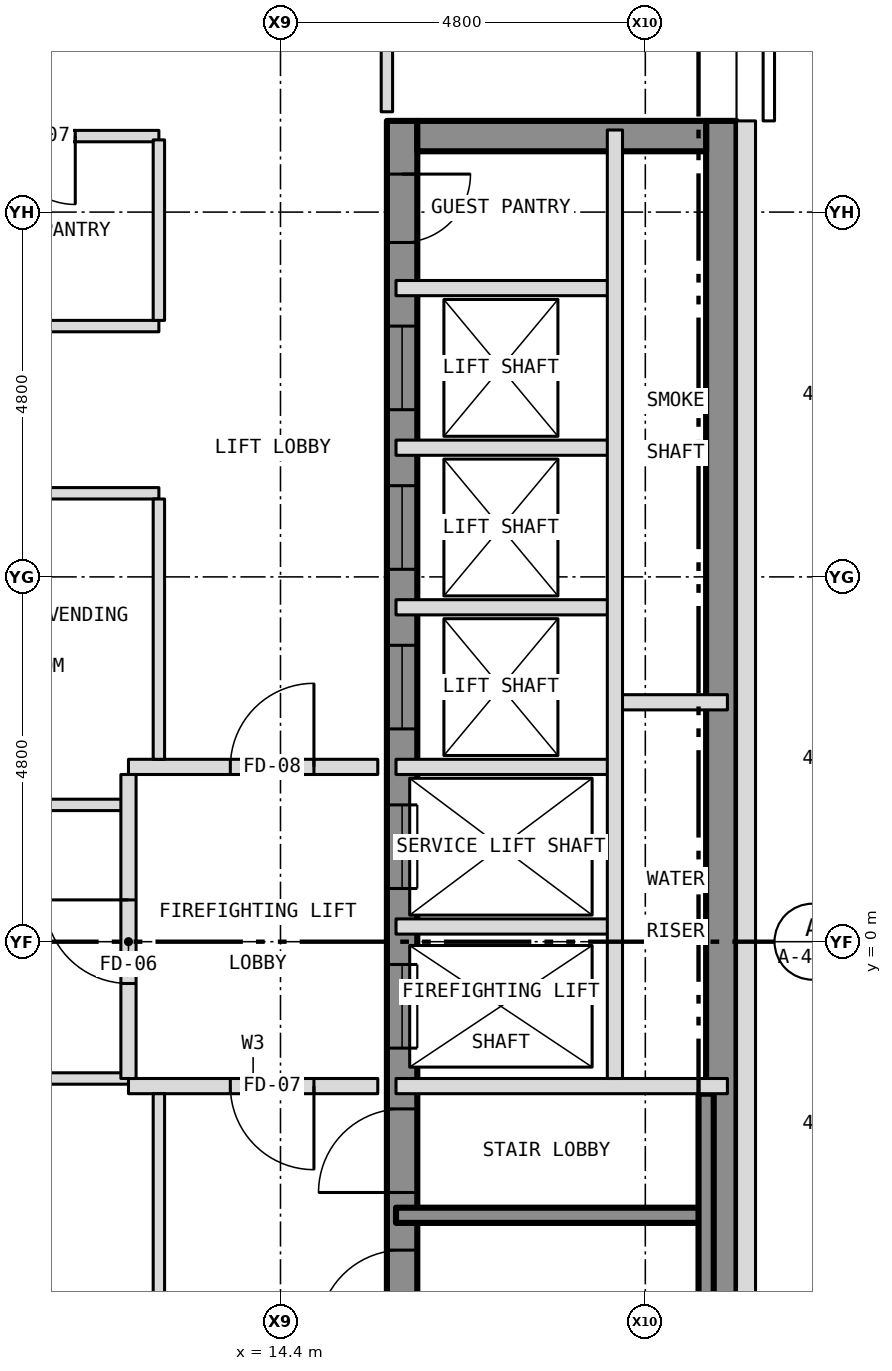
"""IFC4 building model, lengths in metres.
Left out: names, types, materials, properties, quantities, classifications, styles, units other than length and angle.
Written with IfcOpenShell. Run it as: python <this file> out.ifc"""

import sys

from ifc_helpers import new_model, si_unit, direction, frame, frame_2d, origin, place, context, subcontext, project, spatial, rectangle, extrude, element, fill, save


model = new_model("IFC4")
c1 = context("Model", 3, precision=1e-05, world=origin(), true_north=direction((0.0, 1.0)))
c2 = subcontext(c1, "Body", "Model", "MODEL_VIEW")
j1 = project(units=[si_unit("LENGTHUNIT", "METRE"), si_unit("PLANEANGLEUNIT", "RADIAN")], contexts=[c1])
p1 = place(None, origin())
s1 = spatial("IfcSite", under=j1, at=p1, CompositionType="ELEMENT")
p2 = place(p1, origin())
s2 = spatial("IfcBuilding", under=s1, at=p2, CompositionType="ELEMENT")
p3 = place(p2, frame((0.0, 0.0, 233.0)))
s3 = spatial("IfcBuildingStorey", under=s2, at=p3, CompositionType="ELEMENT", Elevation=233.0)
p4 = place(p3, frame((16.0, -10.8, 0.0), z_axis=(0.0, 0.0, 1.0), x_axis=(0.0, 1.0, 0.0)))
e1 = element("IfcWall", 1, at=p4, inside=s3, PredefinedType="SHEAR", context=c2, shape_type="SweptSolid", body=[
    extrude(rectangle(XDim=21.6, YDim=0.4, at=frame_2d((10.8, 0.0))), origin(), (0.0, 0.0, 1.0), 2.9),
])
p5 = place(p4, frame((9.4, 0.0, 0.0)))
e2 = element("IfcOpeningElement", 2, at=p5, cuts=e1, PredefinedType="OPENING", context=c2, shape_type="SweptSolid", body=[
    extrude(rectangle(XDim=1.1, YDim=2.1, at=frame_2d((0.55, 1.05))), frame((0.0, 0.212, 0.0), z_axis=(0.0, -1.0, 0.0), x_axis=(1.0, 0.0, 0.0)), (0.0, 0.0, 1.0), 0.424),
])
p6 = place(p4, frame((11.5, 0.0, 0.0)))
e3 = element("IfcOpeningElement", 3, at=p6, cuts=e1, PredefinedType="OPENING", context=c2, shape_type="SweptSolid", body=[
    extrude(rectangle(XDim=1.1, YDim=2.1, at=frame_2d((0.55, 1.05))), frame((0.0, 0.212, 0.0), z_axis=(0.0, -1.0, 0.0), x_axis=(1.0, 0.0, 0.0)), (0.0, 0.0, 1.0), 0.424),
])
p7 = place(p4, frame((13.6, 0.0, 0.0)))
e4 = element("IfcOpeningElement", 4, at=p7, cuts=e1, PredefinedType="OPENING", context=c2, shape_type="SweptSolid", body=[
    extrude(rectangle(XDim=1.1, YDim=2.1, at=frame_2d((0.55, 1.05))), frame((0.0, 0.212, 0.0), z_axis=(0.0, -1.0, 0.0), x_axis=(1.0, 0.0, 0.0)), (0.0, 0.0, 1.0), 0.424),
])
p8 = place(p4, frame((15.7, 0.0, 0.0)))
e5 = element("IfcOpeningElement", 5, at=p8, cuts=e1, PredefinedType="OPENING", context=c2, shape_type="SweptSolid", body=[
    extrude(rectangle(XDim=1.1, YDim=2.1, at=frame_2d((0.55, 1.05))), frame((0.0, 0.212, 0.0), z_axis=(0.0, -1.0, 0.0), x_axis=(1.0, 0.0, 0.0)), (0.0, 0.0, 1.0), 0.424),
])
p9 = place(p4, frame((17.8, 0.0, 0.0)))
e6 = element("IfcOpeningElement", 6, at=p9, cuts=e1, PredefinedType="OPENING", context=c2, shape_type="SweptSolid", body=[
    extrude(rectangle(XDim=1.1, YDim=2.1, at=frame_2d((0.55, 1.05))), frame((0.0, 0.212, 0.0), z_axis=(0.0, -1.0, 0.0), x_axis=(1.0, 0.0, 0.0)), (0.0, 0.0, 1.0), 0.424),
])
p10 = place(p4, frame((5.642, 0.0, 0.0)))
e7 = element("IfcOpeningElement", 7, at=p10, cuts=e1, PredefinedType="OPENING", context=c2, shape_type="SweptSolid", body=[
    extrude(rectangle(XDim=1.1, YDim=2.1, at=frame_2d((0.55, 1.05))), frame((0.0, 0.212, 0.0), z_axis=(0.0, -1.0, 0.0), x_axis=(1.0, 0.0, 0.0)), (0.0, 0.0, 1.0), 0.424),
])
p11 = place(p4, frame((7.5, 0.0, 0.0)))
e8 = element("IfcOpeningElement", 8, at=p11, cuts=e1, PredefinedType="OPENING", context=c2, shape_type="SweptSolid", body=[
    extrude(rectangle(XDim=1.1, YDim=2.1, at=frame_2d((0.55, 1.05))), frame((0.0, 0.212, 0.0), z_axis=(0.0, -1.0, 0.0), x_axis=(1.0, 0.0, 0.0)), (0.0, 0.0, 1.0), 0.424),
])
p12 = place(p4, frame((20.0, 0.0, 0.0)))
e9 = element("IfcOpeningElement", 9, at=p12, cuts=e1, PredefinedType="OPENING", context=c2, shape_type="SweptSolid", body=[
    extrude(rectangle(XDim=0.9, YDim=2.1, at=frame_2d((0.45, 1.05))), frame((0.0, 0.212, 0.0), z_axis=(0.0, -1.0, 0.0), x_axis=(1.0, 0.0, 0.0)), (0.0, 0.0, 1.0), 0.424),
])
p13 = place(p3, frame((20.2, -10.8, 0.0), z_axis=(0.0, 0.0, 1.0), x_axis=(0.0, 1.0, 0.0)))
e10 = element("IfcWall", 10, at=p13, inside=s3, PredefinedType="SHEAR", context=c2, shape_type="SweptSolid", body=[
    extrude(rectangle(XDim=21.6, YDim=0.4, at=frame_2d((10.8, 0.0))), origin(), (0.0, 0.0, 1.0), 2.9),
])
p14 = place(p3, frame((16.2, 10.6, 0.0), z_axis=(0.0, 0.0, 1.0), x_axis=(1.0, 0.0, 0.0)))
e11 = element("IfcWall", 11, at=p14, inside=s3, PredefinedType="SHEAR", context=c2, shape_type="SweptSolid", body=[
    extrude(rectangle(XDim=3.8, YDim=0.4, at=frame_2d((1.9, 0.0))), origin(), (0.0, 0.0, 1.0), 2.9),
])
p15 = place(p3, frame((20.525, -10.8, 0.0), z_axis=(0.0, 0.0, 1.0), x_axis=(0.0, 1.0, 0.0)))
e12 = element("IfcWall", 12, at=p15, inside=s3, PredefinedType="SOLIDWALL", context=c2, shape_type="SweptSolid", body=[
    extrude(rectangle(XDim=21.6, YDim=0.25, at=frame_2d((10.8, 0.0))), origin(), (0.0, 0.0, 1.0), 3.5),
])
p16 = place(p15, frame((2.95, 0.0, 1.0)))
e13 = element("IfcOpeningElement", 13, at=p16, cuts=e12, PredefinedType="OPENING", context=c2, shape_type="SweptSolid", body=[
    extrude(rectangle(XDim=0.6, YDim=1.5, at=frame_2d((0.3, 0.75))), frame((0.0, 0.137, 0.0), z_axis=(0.0, -1.0, 0.0), x_axis=(1.0, 0.0, 0.0)), (0.0, 0.0, 1.0), 0.274),
])
p17 = place(p3, frame((15.92, -3.6, 0.0), z_axis=(0.0, 0.0, 1.0), x_axis=(1.0, 0.0, 0.0)))
e14 = element("IfcWall", 14, at=p17, inside=s3, PredefinedType="SHEAR", context=c2, shape_type="SweptSolid", body=[
    extrude(rectangle(XDim=4.08, YDim=0.2, at=frame_2d((2.04, 0.0))), origin(), (0.0, 0.0, 1.0), 2.9),
])
p18 = place(p3, frame((12.4, -1.9, 0.0), z_axis=(0.0, 0.0, 1.0), x_axis=(1.0, 0.0, 0.0)))
e15 = element("IfcWall", 15, at=p18, inside=s3, PredefinedType="PARTITIONING", context=c2, shape_type="SweptSolid", body=[
    extrude(rectangle(XDim=3.28, YDim=0.2, at=frame_2d((1.64, 0.0))), origin(), (0.0, 0.0, 1.0), 3.2),
])
p19 = place(p18, frame((1.34, 0.0, 0.0)))
e16 = element("IfcOpeningElement", 16, at=p19, cuts=e15, PredefinedType="OPENING", context=c2, shape_type="SweptSolid", body=[
    extrude(rectangle(XDim=1.1, YDim=2.1, at=frame_2d((0.55, 1.05))), frame((0.0, 0.112, 0.0), z_axis=(0.0, -1.0, 0.0), x_axis=(1.0, 0.0, 0.0)), (0.0, 0.0, 1.0), 0.224),
])
p20 = place(p3, frame((15.92, -1.9, 0.0), z_axis=(0.0, 0.0, 1.0), x_axis=(1.0, 0.0, 0.0)))
e17 = element("IfcWall", 17, at=p20, inside=s3, PredefinedType="PARTITIONING", context=c2, shape_type="SweptSolid", body=[
    extrude(rectangle(XDim=4.36, YDim=0.2, at=frame_2d((2.18, 0.0))), origin(), (0.0, 0.0, 1.0), 2.9),
])
p21 = place(p3, frame((9.7, -1.8, 0.0), z_axis=(0.0, 0.0, 1.0), x_axis=(1.0, 0.0, 0.0)))
e18 = element("IfcWall", 18, at=p21, inside=s3, PredefinedType="PARTITIONING", context=c2, shape_type="SweptSolid", body=[
    extrude(rectangle(XDim=2.7, YDim=0.15, at=frame_2d((1.35, 0.0))), origin(), (0.0, 0.0, 1.0), 3.2),
])
p22 = place(p3, frame((15.92, 0.2, 0.0), z_axis=(0.0, 0.0, 1.0), x_axis=(1.0, 0.0, 0.0)))
e19 = element("IfcWall", 19, at=p22, inside=s3, PredefinedType="PARTITIONING", context=c2, shape_type="SweptSolid", body=[
    extrude(rectangle(XDim=2.88, YDim=0.2, at=frame_2d((1.44, 0.0))), origin(), (0.0, 0.0, 1.0), 2.9),
])
p23 = place(p3, frame((9.7, 1.8, 0.0), z_axis=(0.0, 0.0, 1.0), x_axis=(1.0, 0.0, 0.0)))
e20 = element("IfcWall", 20, at=p23, inside=s3, PredefinedType="PARTITIONING", context=c2, shape_type="SweptSolid", body=[
    extrude(rectangle(XDim=2.7, YDim=0.15, at=frame_2d((1.35, 0.0))), origin(), (0.0, 0.0, 1.0), 3.2),
])
p24 = place(p3, frame((12.4, 2.3, 0.0), z_axis=(0.0, 0.0, 1.0), x_axis=(1.0, 0.0, 0.0)))
e21 = element("IfcWall", 21, at=p24, inside=s3, PredefinedType="PARTITIONING", context=c2, shape_type="SweptSolid", body=[
    extrude(rectangle(XDim=3.28, YDim=0.2, at=frame_2d((1.64, 0.0))), origin(), (0.0, 0.0, 1.0), 3.2),
])
p25 = place(p24, frame((1.34, 0.0, 0.0)))
e22 = element("IfcOpeningElement", 22, at=p25, cuts=e21, PredefinedType="OPENING", context=c2, shape_type="SweptSolid", body=[
    extrude(rectangle(XDim=1.1, YDim=2.1, at=frame_2d((0.55, 1.05))), frame((0.0, 0.112, 0.0), z_axis=(0.0, -1.0, 0.0), x_axis=(1.0, 0.0, 0.0)), (0.0, 0.0, 1.0), 0.224),
])
p26 = place(p3, frame((15.92, 2.3, 0.0), z_axis=(0.0, 0.0, 1.0), x_axis=(1.0, 0.0, 0.0)))
e23 = element("IfcWall", 23, at=p26, inside=s3, PredefinedType="PARTITIONING", context=c2, shape_type="SweptSolid", body=[
    extrude(rectangle(XDim=2.88, YDim=0.2, at=frame_2d((1.44, 0.0))), origin(), (0.0, 0.0, 1.0), 2.9),
])
p27 = place(p3, frame((18.8, 3.15, 0.0), z_axis=(0.0, 0.0, 1.0), x_axis=(1.0, 0.0, 0.0)))
e24 = element("IfcWall", 24, at=p27, inside=s3, PredefinedType="PARTITIONING", context=c2, shape_type="SweptSolid", body=[
    extrude(rectangle(XDim=1.48, YDim=0.2, at=frame_2d((0.74, 0.0))), origin(), (0.0, 0.0, 1.0), 2.9),
])
p28 = place(p3, frame((15.92, 4.4, 0.0), z_axis=(0.0, 0.0, 1.0), x_axis=(1.0, 0.0, 0.0)))
e25 = element("IfcWall", 25, at=p28, inside=s3, PredefinedType="PARTITIONING", context=c2, shape_type="SweptSolid", body=[
    extrude(rectangle(XDim=2.88, YDim=0.2, at=frame_2d((1.44, 0.0))), origin(), (0.0, 0.0, 1.0), 2.9),
])
p29 = place(p3, frame((9.7, 5.9, 0.0), z_axis=(0.0, 0.0, 1.0), x_axis=(1.0, 0.0, 0.0)))
e26 = element("IfcWall", 26, at=p29, inside=s3, PredefinedType="PARTITIONING", context=c2, shape_type="SweptSolid", body=[
    extrude(rectangle(XDim=3.1, YDim=0.15, at=frame_2d((1.55, 0.0))), origin(), (0.0, 0.0, 1.0), 3.2),
])
p30 = place(p3, frame((15.92, 6.5, 0.0), z_axis=(0.0, 0.0, 1.0), x_axis=(1.0, 0.0, 0.0)))
e27 = element("IfcWall", 27, at=p30, inside=s3, PredefinedType="PARTITIONING", context=c2, shape_type="SweptSolid", body=[
    extrude(rectangle(XDim=2.88, YDim=0.2, at=frame_2d((1.44, 0.0))), origin(), (0.0, 0.0, 1.0), 2.9),
])
p31 = place(p3, frame((9.7, 8.1, 0.0), z_axis=(0.0, 0.0, 1.0), x_axis=(1.0, 0.0, 0.0)))
e28 = element("IfcWall", 28, at=p31, inside=s3, PredefinedType="PARTITIONING", context=c2, shape_type="SweptSolid", body=[
    extrude(rectangle(XDim=3.1, YDim=0.15, at=frame_2d((1.55, 0.0))), origin(), (0.0, 0.0, 1.0), 3.2),
])
p32 = place(p3, frame((15.92, 8.6, 0.0), z_axis=(0.0, 0.0, 1.0), x_axis=(1.0, 0.0, 0.0)))
e29 = element("IfcWall", 29, at=p32, inside=s3, PredefinedType="PARTITIONING", context=c2, shape_type="SweptSolid", body=[
    extrude(rectangle(XDim=2.88, YDim=0.2, at=frame_2d((1.44, 0.0))), origin(), (0.0, 0.0, 1.0), 2.9),
])
p33 = place(p3, frame((9.7, 10.6, 0.0), z_axis=(0.0, 0.0, 1.0), x_axis=(1.0, 0.0, 0.0)))
e30 = element("IfcWall", 30, at=p33, inside=s3, PredefinedType="PARTITIONING", context=c2, shape_type="SweptSolid", body=[
    extrude(rectangle(XDim=3.1, YDim=0.15, at=frame_2d((1.55, 0.0))), origin(), (0.0, 0.0, 1.0), 3.2),
])
p34 = place(p33, frame((1.1, 0.0, 0.0)))
e31 = element("IfcOpeningElement", 31, at=p34, cuts=e30, PredefinedType="OPENING", context=c2, shape_type="SweptSolid", body=[
    extrude(rectangle(XDim=0.9, YDim=2.1, at=frame_2d((0.45, 1.05))), frame((0.0, 0.087, 0.0), z_axis=(0.0, -1.0, 0.0), x_axis=(1.0, 0.0, 0.0)), (0.0, 0.0, 1.0), 0.174),
])
p35 = place(p3, frame((12.4, -1.8, 0.0), z_axis=(0.0, 0.0, 1.0), x_axis=(0.0, 1.0, 0.0)))
e32 = element("IfcWall", 32, at=p35, inside=s3, PredefinedType="PARTITIONING", context=c2, shape_type="SweptSolid", body=[
    extrude(rectangle(XDim=4.0, YDim=0.2, at=frame_2d((2.0, 0.0))), origin(), (0.0, 0.0, 1.0), 3.2),
])
p36 = place(p35, frame((1.25, 0.0, 0.0)))
e33 = element("IfcOpeningElement", 33, at=p36, cuts=e32, PredefinedType="OPENING", context=c2, shape_type="SweptSolid", body=[
    extrude(rectangle(XDim=1.1, YDim=2.1, at=frame_2d((0.55, 1.05))), frame((0.0, 0.112, 0.0), z_axis=(0.0, -1.0, 0.0), x_axis=(1.0, 0.0, 0.0)), (0.0, 0.0, 1.0), 0.224),
])
p37 = place(p3, frame((12.8, -10.525, 0.0), z_axis=(0.0, 0.0, 1.0), x_axis=(0.0, 1.0, 0.0)))
e34 = element("IfcWall", 34, at=p37, inside=s3, PredefinedType="PARTITIONING", context=c2, shape_type="SweptSolid", body=[
    extrude(rectangle(XDim=8.525, YDim=0.15, at=frame_2d((4.262, 0.0))), origin(), (0.0, 0.0, 1.0), 3.2),
])
p38 = place(p3, frame((12.8, 2.4, 0.0), z_axis=(0.0, 0.0, 1.0), x_axis=(0.0, 1.0, 0.0)))
e35 = element("IfcWall", 35, at=p38, inside=s3, PredefinedType="PARTITIONING", context=c2, shape_type="SweptSolid", body=[
    extrude(rectangle(XDim=3.425, YDim=0.15, at=frame_2d((1.712, 0.0))), origin(), (0.0, 0.0, 1.0), 3.2),
])
p39 = place(p3, frame((12.8, 8.175, 0.0), z_axis=(0.0, 0.0, 1.0), x_axis=(0.0, 1.0, 0.0)))
e36 = element("IfcWall", 36, at=p39, inside=s3, PredefinedType="PARTITIONING", context=c2, shape_type="SweptSolid", body=[
    extrude(rectangle(XDim=2.375, YDim=0.15, at=frame_2d((1.188, 0.0))), origin(), (0.0, 0.0, 1.0), 3.2),
])
p40 = place(p3, frame((15.8, 10.92, 0.0), z_axis=(0.0, 0.0, 1.0), x_axis=(0.0, 1.0, 0.0)))
e37 = element("IfcWall", 37, at=p40, inside=s3, PredefinedType="PARTITIONING", context=c2, shape_type="SweptSolid", body=[
    extrude(rectangle(XDim=1.805, YDim=0.15, at=frame_2d((0.903, 0.0))), origin(), (0.0, 0.0, 1.0), 3.2),
])
p41 = place(p3, frame((18.8, -1.8, 0.0), z_axis=(0.0, 0.0, 1.0), x_axis=(0.0, 1.0, 0.0)))
e38 = element("IfcWall", 38, at=p41, inside=s3, PredefinedType="PARTITIONING", context=c2, shape_type="SweptSolid", body=[
    extrude(rectangle(XDim=12.48, YDim=0.2, at=frame_2d((6.24, 0.0))), origin(), (0.0, 0.0, 1.0), 2.9),
])
p42 = place(p3, frame((20.0, -10.68, 0.0), z_axis=(0.0, 0.0, 1.0), x_axis=(0.0, 1.0, 0.0)))
e39 = element("IfcWall", 39, at=p42, inside=s3, PredefinedType="SHEAR", context=c2, shape_type="SweptSolid", body=[
    extrude(rectangle(XDim=8.68, YDim=0.2, at=frame_2d((4.34, 0.0))), origin(), (0.0, 0.0, 1.0), 2.9),
])
p43 = place(p5, origin())
e40 = element("IfcDoor", 40, at=p43, inside=s3, OperationType="SLIDING_TO_LEFT", PredefinedType="DOOR", context=c2, shape_type="SweptSolid", body=[
    extrude(rectangle(XDim=1.1, YDim=2.1, at=frame_2d((0.55, 1.05))), frame((0.0, 0.025, 0.0), z_axis=(0.0, -1.0, 0.0), x_axis=(1.0, 0.0, 0.0)), (0.0, 0.0, 1.0), 0.05),
])
fill(e2, e40)
p44 = place(p6, origin())
e41 = element("IfcDoor", 41, at=p44, inside=s3, OperationType="SLIDING_TO_LEFT", PredefinedType="DOOR", context=c2, shape_type="SweptSolid", body=[
    extrude(rectangle(XDim=1.1, YDim=2.1, at=frame_2d((0.55, 1.05))), frame((0.0, 0.025, 0.0), z_axis=(0.0, -1.0, 0.0), x_axis=(1.0, 0.0, 0.0)), (0.0, 0.0, 1.0), 0.05),
])
fill(e3, e41)
p45 = place(p7, origin())
e42 = element("IfcDoor", 42, at=p45, inside=s3, OperationType="SLIDING_TO_LEFT", PredefinedType="DOOR", context=c2, shape_type="SweptSolid", body=[
    extrude(rectangle(XDim=1.1, YDim=2.1, at=frame_2d((0.55, 1.05))), frame((0.0, 0.025, 0.0), z_axis=(0.0, -1.0, 0.0), x_axis=(1.0, 0.0, 0.0)), (0.0, 0.0, 1.0), 0.05),
])
fill(e4, e42)
p46 = place(p8, origin())
e43 = element("IfcDoor", 43, at=p46, inside=s3, OperationType="SLIDING_TO_LEFT", PredefinedType="DOOR", context=c2, shape_type="SweptSolid", body=[
    extrude(rectangle(XDim=1.1, YDim=2.1, at=frame_2d((0.55, 1.05))), frame((0.0, 0.025, 0.0), z_axis=(0.0, -1.0, 0.0), x_axis=(1.0, 0.0, 0.0)), (0.0, 0.0, 1.0), 0.05),
])
fill(e5, e43)
p47 = place(p9, origin())
e44 = element("IfcDoor", 44, at=p47, inside=s3, OperationType="SLIDING_TO_LEFT", PredefinedType="DOOR", context=c2, shape_type="SweptSolid", body=[
    extrude(rectangle(XDim=1.1, YDim=2.1, at=frame_2d((0.55, 1.05))), frame((0.0, 0.025, 0.0), z_axis=(0.0, -1.0, 0.0), x_axis=(1.0, 0.0, 0.0)), (0.0, 0.0, 1.0), 0.05),
])
fill(e6, e44)
p48 = place(p10, origin())
e45 = element("IfcDoor", 45, at=p48, inside=s3, OperationType="SINGLE_SWING_LEFT", PredefinedType="DOOR", context=c2, shape_type="SweptSolid", body=[
    extrude(rectangle(XDim=1.1, YDim=2.1, at=frame_2d((0.55, 1.05))), frame((0.0, 0.025, 0.0), z_axis=(0.0, -1.0, 0.0), x_axis=(1.0, 0.0, 0.0)), (0.0, 0.0, 1.0), 0.05),
])
fill(e7, e45)
p49 = place(p11, origin())
e46 = element("IfcDoor", 46, at=p49, inside=s3, OperationType="SINGLE_SWING_LEFT", PredefinedType="DOOR", context=c2, shape_type="SweptSolid", body=[
    extrude(rectangle(XDim=1.1, YDim=2.1, at=frame_2d((0.55, 1.05))), frame((0.0, 0.025, 0.0), z_axis=(0.0, -1.0, 0.0), x_axis=(1.0, 0.0, 0.0)), (0.0, 0.0, 1.0), 0.05),
])
fill(e8, e46)
p50 = place(p12, origin())
e47 = element("IfcDoor", 47, at=p50, inside=s3, OperationType="SINGLE_SWING_RIGHT", PredefinedType="DOOR", context=c2, shape_type="SweptSolid", body=[
    extrude(rectangle(XDim=0.9, YDim=2.1, at=frame_2d((0.45, 1.05))), frame((0.0, 0.025, 0.0), z_axis=(0.0, -1.0, 0.0), x_axis=(1.0, 0.0, 0.0)), (0.0, 0.0, 1.0), 0.05),
])
fill(e9, e47)
p51 = place(p36, origin())
e48 = element("IfcDoor", 48, at=p51, inside=s3, OperationType="SINGLE_SWING_RIGHT", PredefinedType="DOOR", context=c2, shape_type="SweptSolid", body=[
    extrude(rectangle(XDim=1.1, YDim=2.1, at=frame_2d((0.55, 1.05))), frame((0.0, 0.025, 0.0), z_axis=(0.0, -1.0, 0.0), x_axis=(1.0, 0.0, 0.0)), (0.0, 0.0, 1.0), 0.05),
])
fill(e33, e48)
p52 = place(p19, origin())
e49 = element("IfcDoor", 49, at=p52, inside=s3, OperationType="SINGLE_SWING_RIGHT", PredefinedType="DOOR", context=c2, shape_type="SweptSolid", body=[
    extrude(rectangle(XDim=1.1, YDim=2.1, at=frame_2d((0.55, 1.05))), frame((0.0, 0.025, 0.0), z_axis=(0.0, -1.0, 0.0), x_axis=(1.0, 0.0, 0.0)), (0.0, 0.0, 1.0), 0.05),
])
fill(e16, e49)
p53 = place(p25, origin())
e50 = element("IfcDoor", 50, at=p53, inside=s3, OperationType="SINGLE_SWING_RIGHT", PredefinedType="DOOR", context=c2, shape_type="SweptSolid", body=[
    extrude(rectangle(XDim=1.1, YDim=2.1, at=frame_2d((0.55, 1.05))), frame((0.0, 0.025, 0.0), z_axis=(0.0, -1.0, 0.0), x_axis=(1.0, 0.0, 0.0)), (0.0, 0.0, 1.0), 0.05),
])
fill(e22, e50)
p54 = place(p34, origin())
e51 = element("IfcDoor", 51, at=p54, inside=s3, OperationType="SINGLE_SWING_RIGHT", PredefinedType="DOOR", context=c2, shape_type="SweptSolid", body=[
    extrude(rectangle(XDim=0.9, YDim=2.1, at=frame_2d((0.45, 1.05))), frame((0.0, 0.025, 0.0), z_axis=(0.0, -1.0, 0.0), x_axis=(1.0, 0.0, 0.0)), (0.0, 0.0, 1.0), 0.05),
])
fill(e31, e51)
save(model, sys.argv[1])
